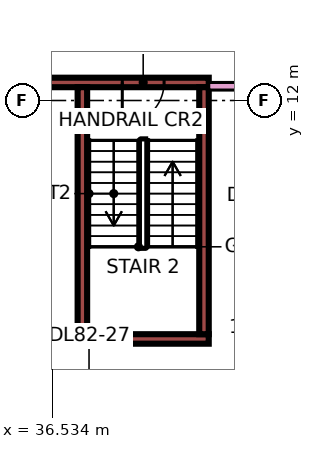
"""IFC4 building model, lengths in metres.
Left out: names, types, materials, properties, quantities, classifications, styles, units other than length and angle.
Written with IfcOpenShell. Run it as: python <this file> out.ifc"""

import sys

from ifc_helpers import new_model, si_unit, direction, frame, frame_2d, origin, place, context, subcontext, project, spatial, rectangle, extrude, element, fill, save


model = new_model("IFC4")
c1 = context("Model", 3, precision=1e-05, world=origin(), true_north=direction((0.0, 1.0)))
c2 = subcontext(c1, "Body", "Model", "MODEL_VIEW")
j1 = project(units=[si_unit("LENGTHUNIT", "METRE"), si_unit("PLANEANGLEUNIT", "RADIAN")], contexts=[c1])
p1 = place(None, origin())
s1 = spatial("IfcSite", under=j1, at=p1, CompositionType="ELEMENT")
p2 = place(p1, origin())
s2 = spatial("IfcBuilding", under=s1, at=p2, CompositionType="ELEMENT")
p3 = place(p2, frame((0.0, 0.0, 353.9)))
s3 = spatial("IfcBuildingStorey", under=s2, at=p3, CompositionType="ELEMENT", Elevation=353.9)
p4 = place(p3, frame((37.2, 5.725, 0.0), z_axis=(0.0, 0.0, 1.0), x_axis=(1.0, 0.0, 0.0)))
e1 = element("IfcWall", 1, at=p4, inside=s3, PredefinedType="SHEAR", context=c2, shape_type="SweptSolid", body=[
    extrude(rectangle(XDim=3.45, YDim=0.25, at=frame_2d((1.725, 0.0))), origin(), (0.0, 0.0, 1.0), 3.75),
])
p5 = place(p3, frame((36.375, 12.475, 0.0), z_axis=(0.0, 0.0, 1.0), x_axis=(1.0, 0.0, 0.0)))
e2 = element("IfcWall", 2, at=p5, inside=s3, PredefinedType="SHEAR", context=c2, shape_type="SweptSolid", body=[
    extrude(rectangle(XDim=4.275, YDim=0.25, at=frame_2d((2.137, 0.0))), origin(), (0.0, 0.0, 1.0), 3.75),
])
p6 = place(p5, frame((2.0, 0.0, 0.0)))
e3 = element("IfcOpeningElement", 3, at=p6, cuts=e2, PredefinedType="OPENING", context=c2, shape_type="SweptSolid", body=[
    extrude(rectangle(XDim=1.1, YDim=2.2, at=frame_2d((0.55, 1.1))), frame((0.0, 0.135, 0.0), z_axis=(0.0, -1.0, 0.0), x_axis=(1.0, 0.0, 0.0)), (0.0, 0.0, 1.0), 0.27),
])
for number, where, z_axis, x_axis in (
    (4, (37.325, 5.85, 0.0), (0.0, 0.0, 1.0), (0.0, 1.0, 0.0)),
    (5, (40.525, 5.85, 0.0), (0.0, 0.0, 1.0), (0.0, 1.0, 0.0)),
):
    element("IfcWall", number, at=place(p3, frame(where, z_axis=z_axis, x_axis=x_axis)), inside=s3, PredefinedType="SHEAR", context=c2, shape_type="SweptSolid", body=[
        extrude(rectangle(XDim=6.5, YDim=0.25, at=frame_2d((3.25, 0.0))), origin(), (0.0, 0.0, 1.0), 3.75),
    ])
p7 = place(p3, frame((40.65, 12.375, 0.0), z_axis=(0.0, 0.0, 1.0), x_axis=(1.0, 0.0, 0.0)))
e6 = element("IfcWall", 6, at=p7, inside=s3, PredefinedType="PARTITIONING", context=c2, shape_type="SweptSolid", body=[
    extrude(rectangle(XDim=13.35, YDim=0.2, at=frame_2d((6.675, 0.0))), origin(), (0.0, 0.0, 1.0), 3.35),
])
p8 = place(p7, frame((1.05, 0.0, 0.0)))
e7 = element("IfcOpeningElement", 7, at=p8, cuts=e6, PredefinedType="OPENING", context=c2, shape_type="SweptSolid", body=[
    extrude(rectangle(XDim=1.0, YDim=2.1, at=frame_2d((0.5, 1.05))), frame((0.0, 0.11, 0.0), z_axis=(0.0, -1.0, 0.0), x_axis=(1.0, 0.0, 0.0)), (0.0, 0.0, 1.0), 0.22),
])
p9 = place(p6, frame((1.1, 0.0, 0.0), z_axis=(0.0, 0.0, 1.0), x_axis=(-1.0, 0.0, 0.0)))
e8 = element("IfcDoor", 8, at=p9, inside=s3, OperationType="SINGLE_SWING_LEFT", PredefinedType="DOOR", context=c2, shape_type="SweptSolid", body=[
    extrude(rectangle(XDim=1.1, YDim=2.2, at=frame_2d((0.55, 1.1))), frame((0.0, 0.025, 0.0), z_axis=(0.0, -1.0, 0.0), x_axis=(1.0, 0.0, 0.0)), (0.0, 0.0, 1.0), 0.05),
])
fill(e3, e8)
save(model, sys.argv[1])
